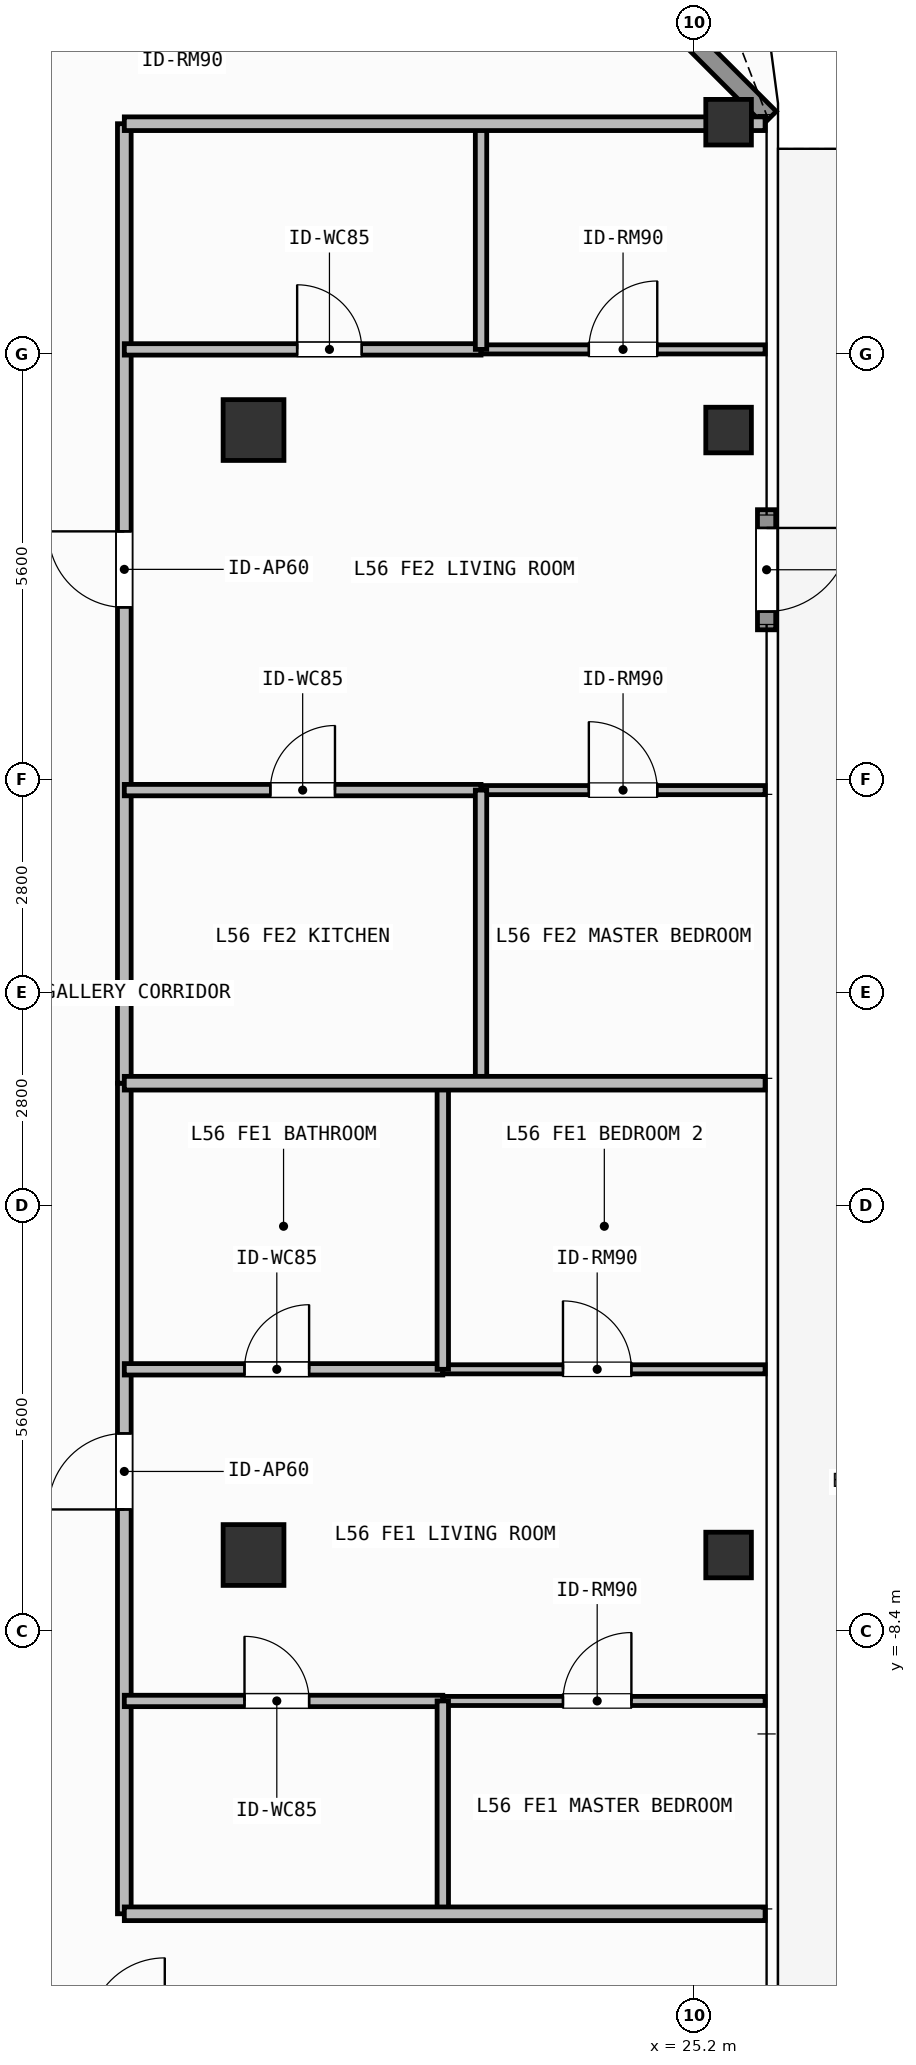
"""IFC4 building model, lengths in metres.
Left out: names, types, materials, properties, quantities, classifications, styles, units other than length and angle.
Written with IfcOpenShell. Run it as: python <this file> out.ifc"""

import sys

from ifc_helpers import new_model, si_unit, direction, frame, frame_2d, origin, origin_2d, place, context, subcontext, project, spatial, rectangle, hollow_rectangle, extrude, element, fill, save


model = new_model("IFC4")
c1 = context("Model", 3, precision=1e-05, world=origin(), true_north=direction((0.0, 1.0)))
c2 = subcontext(c1, "Body", "Model", "MODEL_VIEW")
j1 = project(units=[si_unit("LENGTHUNIT", "METRE"), si_unit("PLANEANGLEUNIT", "RADIAN")], contexts=[c1])
p1 = place(None, origin())
s1 = spatial("IfcSite", under=j1, at=p1, CompositionType="ELEMENT")
p2 = place(p1, origin())
s2 = spatial("IfcBuilding", under=s1, at=p2, CompositionType="ELEMENT")
p3 = place(p2, frame((0.0, 0.0, 227.4)))
s3 = spatial("IfcBuildingStorey", under=s2, at=p3, CompositionType="ELEMENT", Elevation=227.4)
for number, where, z_axis, x_axis in (
    (1, (19.4, -7.4, 0.0), (0.0, 0.0, 1.0), (1.0, 0.0, 0.0)),
    (2, (19.4, 7.4, 0.0), (0.0, 0.0, 1.0), (1.0, 0.0, 0.0)),
):
    element("IfcColumn", number, at=place(p3, frame(where, z_axis=z_axis, x_axis=x_axis)), inside=s3, PredefinedType="COLUMN", context=c2, shape_type="SweptSolid", body=[
        extrude(hollow_rectangle(XDim=0.8, YDim=0.8, WallThickness=0.036, at=origin_2d()), origin(), (0.0, 0.0, 1.0), 3.9),
    ])
for number, where, z_axis, x_axis in (
    (3, (25.65, 11.45, 0.0), (0.0, 0.0, 1.0), (1.0, 0.0, 0.0)),
    (4, (25.65, -7.4, 0.0), (0.0, 0.0, 1.0), (1.0, 0.0, 0.0)),
    (5, (25.65, 7.4, 0.0), (0.0, 0.0, 1.0), (1.0, 0.0, 0.0)),
):
    element("IfcColumn", number, at=place(p3, frame(where, z_axis=z_axis, x_axis=x_axis)), inside=s3, PredefinedType="COLUMN", context=c2, shape_type="SweptSolid", body=[
        extrude(hollow_rectangle(XDim=0.6, YDim=0.6, WallThickness=0.028, at=origin_2d()), origin(), (0.0, 0.0, 1.0), 3.9),
    ])
p4 = place(p3, frame((26.15, 6.352, 0.0), z_axis=(0.0, 0.0, 1.0), x_axis=(0.0, -1.0, 0.0)))
e6 = element("IfcWall", 6, at=p4, inside=s3, PredefinedType="SOLIDWALL", context=c2, shape_type="SweptSolid", body=[
    extrude(rectangle(XDim=1.58, YDim=0.24, at=frame_2d((0.79, 0.0))), origin(), (0.0, 0.0, 1.0), 3.68),
])
p5 = place(p4, frame((0.24, 0.0, 0.0)))
e7 = element("IfcOpeningElement", 7, at=p5, cuts=e6, PredefinedType="OPENING", context=c2, shape_type="SweptSolid", body=[
    extrude(rectangle(XDim=1.1, YDim=2.2, at=frame_2d((0.55, 1.1))), frame((0.0, 0.13, 0.0), z_axis=(0.0, -1.0, 0.0), x_axis=(1.0, 0.0, 0.0)), (0.0, 0.0, 1.0), 0.26),
])
p6 = place(p3, frame((21.808, 15.892, 0.0), z_axis=(0.0, 0.0, 1.0), x_axis=(0.707106781187, -0.707106781187, 0.0)))
e8 = element("IfcWall", 8, at=p6, inside=s3, PredefinedType="SOLIDWALL", context=c2, shape_type="SweptSolid", body=[
    extrude(rectangle(XDim=6.201, YDim=0.24, at=frame_2d((3.101, 0.0))), origin(), (0.0, 0.0, 1.0), 3.68),
])
p7 = place(p6, frame((2.351, 0.0, 0.8)))
e9 = element("IfcOpeningElement", 9, at=p7, cuts=e8, PredefinedType="OPENING", context=c2, shape_type="SweptSolid", body=[
    extrude(rectangle(XDim=1.5, YDim=1.85, at=frame_2d((0.75, 0.925))), frame((0.0, 0.13, 0.0), z_axis=(0.0, -1.0, 0.0), x_axis=(1.0, 0.0, 0.0)), (0.0, 0.0, 1.0), 0.26),
])
p8 = place(p3, frame((17.7, -12.12, 0.0), z_axis=(0.0, 0.0, 1.0), x_axis=(0.0, 1.0, 0.0)))
e10 = element("IfcWall", 10, at=p8, inside=s3, PredefinedType="PARTITIONING", context=c2, shape_type="SweptSolid", body=[
    extrude(rectangle(XDim=10.927, YDim=0.18, at=frame_2d((5.463, 0.0))), origin(), (0.0, 0.0, 1.0), 3.68),
])
p9 = place(p8, frame((5.319, 0.0, 0.0)))
e11 = element("IfcOpeningElement", 11, at=p9, cuts=e10, PredefinedType="OPENING", context=c2, shape_type="SweptSolid", body=[
    extrude(rectangle(XDim=1.0, YDim=2.2, at=frame_2d((0.5, 1.1))), frame((0.0, 0.1, 0.0), z_axis=(0.0, -1.0, 0.0), x_axis=(1.0, 0.0, 0.0)), (0.0, 0.0, 1.0), 0.2),
])
p10 = place(p3, frame((17.7, -4.957, 0.0), z_axis=(0.0, 0.0, 1.0), x_axis=(1.0, 0.0, 0.0)))
e12 = element("IfcWall", 12, at=p10, inside=s3, PredefinedType="PARTITIONING", context=c2, shape_type="SweptSolid", body=[
    extrude(rectangle(XDim=4.19, YDim=0.15, at=frame_2d((2.095, 0.0))), origin(), (0.0, 0.0, 1.0), 3.68),
])
p11 = place(p10, frame((1.581, 0.0, 0.0)))
e13 = element("IfcOpeningElement", 13, at=p11, cuts=e12, PredefinedType="OPENING", context=c2, shape_type="SweptSolid", body=[
    extrude(rectangle(XDim=0.85, YDim=2.1, at=frame_2d((0.425, 1.05))), frame((0.0, 0.085, 0.0), z_axis=(0.0, -1.0, 0.0), x_axis=(1.0, 0.0, 0.0)), (0.0, 0.0, 1.0), 0.17),
])
p12 = place(p3, frame((17.7, -9.32, 0.0), z_axis=(0.0, 0.0, 1.0), x_axis=(1.0, 0.0, 0.0)))
e14 = element("IfcWall", 14, at=p12, inside=s3, PredefinedType="PARTITIONING", context=c2, shape_type="SweptSolid", body=[
    extrude(rectangle(XDim=4.19, YDim=0.15, at=frame_2d((2.095, 0.0))), origin(), (0.0, 0.0, 1.0), 3.68),
])
p13 = place(p12, frame((1.581, 0.0, 0.0)))
e15 = element("IfcOpeningElement", 15, at=p13, cuts=e14, PredefinedType="OPENING", context=c2, shape_type="SweptSolid", body=[
    extrude(rectangle(XDim=0.85, YDim=2.1, at=frame_2d((0.425, 1.05))), frame((0.0, 0.085, 0.0), z_axis=(0.0, -1.0, 0.0), x_axis=(1.0, 0.0, 0.0)), (0.0, 0.0, 1.0), 0.17),
])
p14 = place(p3, frame((21.89, -9.32, 0.0), z_axis=(0.0, 0.0, 1.0), x_axis=(1.0, 0.0, 0.0)))
e16 = element("IfcWall", 16, at=p14, inside=s3, PredefinedType="PARTITIONING", context=c2, shape_type="SweptSolid", body=[
    extrude(rectangle(XDim=4.24, YDim=0.12, at=frame_2d((2.12, 0.0))), origin(), (0.0, 0.0, 1.0), 3.68),
])
p15 = place(p14, frame((1.581, 0.0, 0.0)))
e17 = element("IfcOpeningElement", 17, at=p15, cuts=e16, PredefinedType="OPENING", context=c2, shape_type="SweptSolid", body=[
    extrude(rectangle(XDim=0.9, YDim=2.1, at=frame_2d((0.45, 1.05))), frame((0.0, 0.07, 0.0), z_axis=(0.0, -1.0, 0.0), x_axis=(1.0, 0.0, 0.0)), (0.0, 0.0, 1.0), 0.14),
])
p16 = place(p3, frame((21.89, -4.957, 0.0), z_axis=(0.0, 0.0, 1.0), x_axis=(1.0, 0.0, 0.0)))
e18 = element("IfcWall", 18, at=p16, inside=s3, PredefinedType="PARTITIONING", context=c2, shape_type="SweptSolid", body=[
    extrude(rectangle(XDim=4.24, YDim=0.12, at=frame_2d((2.12, 0.0))), origin(), (0.0, 0.0, 1.0), 3.68),
])
p17 = place(p16, frame((1.581, 0.0, 0.0)))
e19 = element("IfcOpeningElement", 19, at=p17, cuts=e18, PredefinedType="OPENING", context=c2, shape_type="SweptSolid", body=[
    extrude(rectangle(XDim=0.9, YDim=2.1, at=frame_2d((0.45, 1.05))), frame((0.0, 0.07, 0.0), z_axis=(0.0, -1.0, 0.0), x_axis=(1.0, 0.0, 0.0)), (0.0, 0.0, 1.0), 0.14),
])
p18 = place(p3, frame((17.7, -1.193, 0.0), z_axis=(0.0, 0.0, 1.0), x_axis=(0.0, 1.0, 0.0)))
e20 = element("IfcWall", 20, at=p18, inside=s3, PredefinedType="PARTITIONING", context=c2, shape_type="SweptSolid", body=[
    extrude(rectangle(XDim=12.623, YDim=0.18, at=frame_2d((6.312, 0.0))), origin(), (0.0, 0.0, 1.0), 3.68),
])
p19 = place(p18, frame((6.26, 0.0, 0.0)))
e21 = element("IfcOpeningElement", 21, at=p19, cuts=e20, PredefinedType="OPENING", context=c2, shape_type="SweptSolid", body=[
    extrude(rectangle(XDim=1.0, YDim=2.2, at=frame_2d((0.5, 1.1))), frame((0.0, 0.1, 0.0), z_axis=(0.0, -1.0, 0.0), x_axis=(1.0, 0.0, 0.0)), (0.0, 0.0, 1.0), 0.2),
])
p20 = place(p3, frame((17.7, 8.461, 0.0), z_axis=(0.0, 0.0, 1.0), x_axis=(1.0, 0.0, 0.0)))
e22 = element("IfcWall", 22, at=p20, inside=s3, PredefinedType="PARTITIONING", context=c2, shape_type="SweptSolid", body=[
    extrude(rectangle(XDim=4.693, YDim=0.15, at=frame_2d((2.347, 0.0))), origin(), (0.0, 0.0, 1.0), 3.68),
])
p21 = place(p20, frame((2.274, 0.0, 0.0)))
e23 = element("IfcOpeningElement", 23, at=p21, cuts=e22, PredefinedType="OPENING", context=c2, shape_type="SweptSolid", body=[
    extrude(rectangle(XDim=0.85, YDim=2.1, at=frame_2d((0.425, 1.05))), frame((0.0, 0.085, 0.0), z_axis=(0.0, -1.0, 0.0), x_axis=(1.0, 0.0, 0.0)), (0.0, 0.0, 1.0), 0.17),
])
p22 = place(p3, frame((17.7, 2.663, 0.0), z_axis=(0.0, 0.0, 1.0), x_axis=(1.0, 0.0, 0.0)))
e24 = element("IfcWall", 24, at=p22, inside=s3, PredefinedType="PARTITIONING", context=c2, shape_type="SweptSolid", body=[
    extrude(rectangle(XDim=4.693, YDim=0.15, at=frame_2d((2.347, 0.0))), origin(), (0.0, 0.0, 1.0), 3.68),
])
p23 = place(p22, frame((1.921, 0.0, 0.0)))
e25 = element("IfcOpeningElement", 25, at=p23, cuts=e24, PredefinedType="OPENING", context=c2, shape_type="SweptSolid", body=[
    extrude(rectangle(XDim=0.85, YDim=2.1, at=frame_2d((0.425, 1.05))), frame((0.0, 0.085, 0.0), z_axis=(0.0, -1.0, 0.0), x_axis=(1.0, 0.0, 0.0)), (0.0, 0.0, 1.0), 0.17),
])
p24 = place(p3, frame((22.393, 2.663, 0.0), z_axis=(0.0, 0.0, 1.0), x_axis=(1.0, 0.0, 0.0)))
e26 = element("IfcWall", 26, at=p24, inside=s3, PredefinedType="PARTITIONING", context=c2, shape_type="SweptSolid", body=[
    extrude(rectangle(XDim=3.737, YDim=0.12, at=frame_2d((1.868, 0.0))), origin(), (0.0, 0.0, 1.0), 3.68),
])
p25 = place(p24, frame((1.418, 0.0, 0.0)))
e27 = element("IfcOpeningElement", 27, at=p25, cuts=e26, PredefinedType="OPENING", context=c2, shape_type="SweptSolid", body=[
    extrude(rectangle(XDim=0.9, YDim=2.1, at=frame_2d((0.45, 1.05))), frame((0.0, 0.07, 0.0), z_axis=(0.0, -1.0, 0.0), x_axis=(1.0, 0.0, 0.0)), (0.0, 0.0, 1.0), 0.14),
])
p26 = place(p3, frame((22.393, 8.461, 0.0), z_axis=(0.0, 0.0, 1.0), x_axis=(1.0, 0.0, 0.0)))
e28 = element("IfcWall", 28, at=p26, inside=s3, PredefinedType="PARTITIONING", context=c2, shape_type="SweptSolid", body=[
    extrude(rectangle(XDim=3.737, YDim=0.12, at=frame_2d((1.868, 0.0))), origin(), (0.0, 0.0, 1.0), 3.68),
])
p27 = place(p26, frame((1.418, 0.0, 0.0)))
e29 = element("IfcOpeningElement", 29, at=p27, cuts=e28, PredefinedType="OPENING", context=c2, shape_type="SweptSolid", body=[
    extrude(rectangle(XDim=0.9, YDim=2.1, at=frame_2d((0.45, 1.05))), frame((0.0, 0.07, 0.0), z_axis=(0.0, -1.0, 0.0), x_axis=(1.0, 0.0, 0.0)), (0.0, 0.0, 1.0), 0.14),
])
p28 = place(p3, frame((21.89, -12.12, 0.0), z_axis=(0.0, 0.0, 1.0), x_axis=(0.0, 1.0, 0.0)))
e30 = element("IfcWall", 30, at=p28, inside=s3, PredefinedType="PARTITIONING", context=c2, shape_type="SweptSolid", body=[
    extrude(rectangle(XDim=2.8, YDim=0.15, at=frame_2d((1.4, 0.0))), origin(), (0.0, 0.0, 1.0), 3.68),
])
p29 = place(p3, frame((21.89, -4.957, 0.0), z_axis=(0.0, 0.0, 1.0), x_axis=(0.0, 1.0, 0.0)))
e31 = element("IfcWall", 31, at=p29, inside=s3, PredefinedType="PARTITIONING", context=c2, shape_type="SweptSolid", body=[
    extrude(rectangle(XDim=3.764, YDim=0.15, at=frame_2d((1.882, 0.0))), origin(), (0.0, 0.0, 1.0), 3.68),
])
p30 = place(p3, frame((22.393, -1.193, 0.0), z_axis=(0.0, 0.0, 1.0), x_axis=(0.0, 1.0, 0.0)))
e32 = element("IfcWall", 32, at=p30, inside=s3, PredefinedType="PARTITIONING", context=c2, shape_type="SweptSolid", body=[
    extrude(rectangle(XDim=3.856, YDim=0.15, at=frame_2d((1.928, 0.0))), origin(), (0.0, 0.0, 1.0), 3.68),
])
p31 = place(p3, frame((22.393, 8.461, 0.0), z_axis=(0.0, 0.0, 1.0), x_axis=(0.0, 1.0, 0.0)))
e33 = element("IfcWall", 33, at=p31, inside=s3, PredefinedType="PARTITIONING", context=c2, shape_type="SweptSolid", body=[
    extrude(rectangle(XDim=2.969, YDim=0.15, at=frame_2d((1.484, 0.0))), origin(), (0.0, 0.0, 1.0), 3.68),
])
for number, where, z_axis, x_axis in (
    (34, (17.7, -1.193, 0.0), (0.0, 0.0, 1.0), (1.0, 0.0, 0.0)),
    (35, (17.7, -12.12, 0.0), (0.0, 0.0, 1.0), (1.0, 0.0, 0.0)),
):
    element("IfcWall", number, at=place(p3, frame(where, z_axis=z_axis, x_axis=x_axis)), inside=s3, PredefinedType="PARTITIONING", context=c2, shape_type="SweptSolid", body=[
        extrude(rectangle(XDim=8.43, YDim=0.18, at=frame_2d((4.215, 0.0))), origin(), (0.0, 0.0, 1.0), 3.68),
    ])
p32 = place(p3, frame((17.7, 11.43, 0.0), z_axis=(0.0, 0.0, 1.0), x_axis=(1.0, 0.0, 0.0)))
e36 = element("IfcWall", 36, at=p32, inside=s3, PredefinedType="PARTITIONING", context=c2, shape_type="SweptSolid", body=[
    extrude(rectangle(XDim=8.43, YDim=0.18, at=frame_2d((4.215, 0.0))), origin(), (0.0, 0.0, 1.0), 3.42),
])
p33 = place(p5, origin())
e37 = element("IfcDoor", 37, at=p33, inside=s3, OperationType="SINGLE_SWING_LEFT", PredefinedType="DOOR", context=c2, shape_type="SweptSolid", body=[
    extrude(rectangle(XDim=1.1, YDim=2.2, at=frame_2d((0.55, 1.1))), frame((0.0, 0.025, 0.0), z_axis=(0.0, -1.0, 0.0), x_axis=(1.0, 0.0, 0.0)), (0.0, 0.0, 1.0), 0.05),
])
fill(e7, e37)
p34 = place(p9, origin())
e38 = element("IfcDoor", 38, at=p34, inside=s3, OperationType="SINGLE_SWING_LEFT", PredefinedType="DOOR", context=c2, shape_type="SweptSolid", body=[
    extrude(rectangle(XDim=1.0, YDim=2.2, at=frame_2d((0.5, 1.1))), frame((0.0, 0.025, 0.0), z_axis=(0.0, -1.0, 0.0), x_axis=(1.0, 0.0, 0.0)), (0.0, 0.0, 1.0), 0.05),
])
fill(e11, e38)
p35 = place(p11, origin())
e39 = element("IfcDoor", 39, at=p35, inside=s3, OperationType="SINGLE_SWING_RIGHT", PredefinedType="DOOR", context=c2, shape_type="SweptSolid", body=[
    extrude(rectangle(XDim=0.85, YDim=2.1, at=frame_2d((0.425, 1.05))), frame((0.0, 0.025, 0.0), z_axis=(0.0, -1.0, 0.0), x_axis=(1.0, 0.0, 0.0)), (0.0, 0.0, 1.0), 0.05),
])
fill(e13, e39)
p36 = place(p13, origin())
e40 = element("IfcDoor", 40, at=p36, inside=s3, OperationType="SINGLE_SWING_LEFT", PredefinedType="DOOR", context=c2, shape_type="SweptSolid", body=[
    extrude(rectangle(XDim=0.85, YDim=2.1, at=frame_2d((0.425, 1.05))), frame((0.0, 0.025, 0.0), z_axis=(0.0, -1.0, 0.0), x_axis=(1.0, 0.0, 0.0)), (0.0, 0.0, 1.0), 0.05),
])
fill(e15, e40)
p37 = place(p15, origin())
e41 = element("IfcDoor", 41, at=p37, inside=s3, OperationType="SINGLE_SWING_RIGHT", PredefinedType="DOOR", context=c2, shape_type="SweptSolid", body=[
    extrude(rectangle(XDim=0.9, YDim=2.1, at=frame_2d((0.45, 1.05))), frame((0.0, 0.025, 0.0), z_axis=(0.0, -1.0, 0.0), x_axis=(1.0, 0.0, 0.0)), (0.0, 0.0, 1.0), 0.05),
])
fill(e17, e41)
p38 = place(p17, origin())
e42 = element("IfcDoor", 42, at=p38, inside=s3, OperationType="SINGLE_SWING_LEFT", PredefinedType="DOOR", context=c2, shape_type="SweptSolid", body=[
    extrude(rectangle(XDim=0.9, YDim=2.1, at=frame_2d((0.45, 1.05))), frame((0.0, 0.025, 0.0), z_axis=(0.0, -1.0, 0.0), x_axis=(1.0, 0.0, 0.0)), (0.0, 0.0, 1.0), 0.05),
])
fill(e19, e42)
p39 = place(p19, origin())
e43 = element("IfcDoor", 43, at=p39, inside=s3, OperationType="SINGLE_SWING_RIGHT", PredefinedType="DOOR", context=c2, shape_type="SweptSolid", body=[
    extrude(rectangle(XDim=1.0, YDim=2.2, at=frame_2d((0.5, 1.1))), frame((0.0, 0.025, 0.0), z_axis=(0.0, -1.0, 0.0), x_axis=(1.0, 0.0, 0.0)), (0.0, 0.0, 1.0), 0.05),
])
fill(e21, e43)
p40 = place(p21, origin())
e44 = element("IfcDoor", 44, at=p40, inside=s3, OperationType="SINGLE_SWING_LEFT", PredefinedType="DOOR", context=c2, shape_type="SweptSolid", body=[
    extrude(rectangle(XDim=0.85, YDim=2.1, at=frame_2d((0.425, 1.05))), frame((0.0, 0.025, 0.0), z_axis=(0.0, -1.0, 0.0), x_axis=(1.0, 0.0, 0.0)), (0.0, 0.0, 1.0), 0.05),
])
fill(e23, e44)
p41 = place(p23, origin())
e45 = element("IfcDoor", 45, at=p41, inside=s3, OperationType="SINGLE_SWING_RIGHT", PredefinedType="DOOR", context=c2, shape_type="SweptSolid", body=[
    extrude(rectangle(XDim=0.85, YDim=2.1, at=frame_2d((0.425, 1.05))), frame((0.0, 0.025, 0.0), z_axis=(0.0, -1.0, 0.0), x_axis=(1.0, 0.0, 0.0)), (0.0, 0.0, 1.0), 0.05),
])
fill(e25, e45)
p42 = place(p25, origin())
e46 = element("IfcDoor", 46, at=p42, inside=s3, OperationType="SINGLE_SWING_LEFT", PredefinedType="DOOR", context=c2, shape_type="SweptSolid", body=[
    extrude(rectangle(XDim=0.9, YDim=2.1, at=frame_2d((0.45, 1.05))), frame((0.0, 0.025, 0.0), z_axis=(0.0, -1.0, 0.0), x_axis=(1.0, 0.0, 0.0)), (0.0, 0.0, 1.0), 0.05),
])
fill(e27, e46)
p43 = place(p27, origin())
e47 = element("IfcDoor", 47, at=p43, inside=s3, OperationType="SINGLE_SWING_RIGHT", PredefinedType="DOOR", context=c2, shape_type="SweptSolid", body=[
    extrude(rectangle(XDim=0.9, YDim=2.1, at=frame_2d((0.45, 1.05))), frame((0.0, 0.025, 0.0), z_axis=(0.0, -1.0, 0.0), x_axis=(1.0, 0.0, 0.0)), (0.0, 0.0, 1.0), 0.05),
])
fill(e29, e47)
save(model, sys.argv[1])
